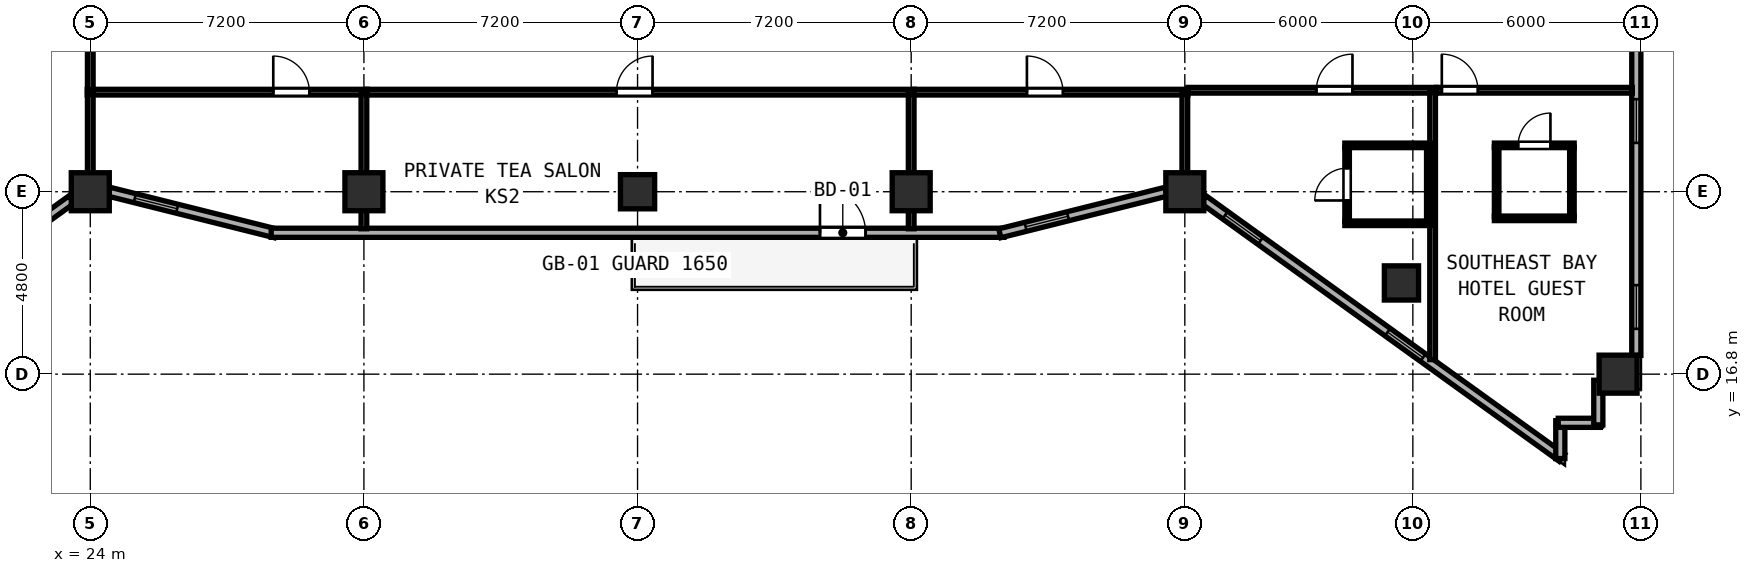
"""IFC4 building model, lengths in metres.
Left out: names, types, materials, properties, quantities, classifications, styles, units other than length and angle.
Written with IfcOpenShell. Run it as: python <this file> out.ifc"""

import sys

from ifc_helpers import new_model, si_unit, direction, frame, frame_2d, origin, origin_2d, place, context, subcontext, project, spatial, rectangle, hollow_rectangle, extrude, element, fill, save


model = new_model("IFC4")
c1 = context("Model", 3, precision=1e-05, world=origin(), true_north=direction((0.0, 1.0)))
c2 = subcontext(c1, "Body", "Model", "MODEL_VIEW")
j1 = project(units=[si_unit("LENGTHUNIT", "METRE"), si_unit("PLANEANGLEUNIT", "RADIAN")], contexts=[c1])
p1 = place(None, origin())
s1 = spatial("IfcSite", under=j1, at=p1, CompositionType="ELEMENT")
p2 = place(p1, origin())
s2 = spatial("IfcBuilding", under=s1, at=p2, CompositionType="ELEMENT")
p3 = place(p2, frame((0.0, 0.0, 106.0)))
s3 = spatial("IfcBuildingStorey", under=s2, at=p3, CompositionType="ELEMENT", Elevation=106.0)
for number, where, z_axis, x_axis in (
    (1, (24.0, 21.6, 0.0), (0.0, 0.0, 1.0), (1.0, 0.0, 0.0)),
    (2, (52.8, 21.6, 0.0), (0.0, 0.0, 1.0), (1.0, 0.0, 0.0)),
    (3, (31.2, 21.6, 0.0), (0.0, 0.0, 1.0), (1.0, 0.0, 0.0)),
    (4, (45.6, 21.6, 0.0), (0.0, 0.0, 1.0), (1.0, 0.0, 0.0)),
    (5, (64.2, 16.8, 0.0), (0.0, 0.0, 1.0), (1.0, 0.0, 0.0)),
):
    element("IfcColumn", number, at=place(p3, frame(where, z_axis=z_axis, x_axis=x_axis)), inside=s3, PredefinedType="COLUMN", context=c2, shape_type="SweptSolid", body=[
        extrude(hollow_rectangle(XDim=1.0, YDim=1.0, WallThickness=0.038, at=origin_2d()), origin(), (0.0, 0.0, 1.0), 3.8),
    ])
for number, where, z_axis, x_axis in (
    (6, (38.4, 21.6, 0.0), (0.0, 0.0, 1.0), (1.0, 0.0, 0.0)),
    (7, (58.5, 19.2, 0.0), (0.0, 0.0, 1.0), (1.0, 0.0, 0.0)),
):
    element("IfcColumn", number, at=place(p3, frame(where, z_axis=z_axis, x_axis=x_axis)), inside=s3, PredefinedType="COLUMN", context=c2, shape_type="SweptSolid", body=[
        extrude(hollow_rectangle(XDim=0.9, YDim=0.9, WallThickness=0.034, at=origin_2d()), origin(), (0.0, 0.0, 1.0), 3.8),
    ])
p4 = place(p3, frame((14.075, 14.602, 0.0), z_axis=(0.0, 0.0, 1.0), x_axis=(0.811543504691, 0.584291998913, 0.0)))
e8 = element("IfcWall", 8, at=p4, inside=s3, PredefinedType="SOLIDWALL", context=c2, shape_type="SweptSolid", body=[
    extrude(rectangle(XDim=11.623, YDim=0.24, at=frame_2d((5.812, 0.0))), origin(), (0.0, 0.0, 1.0), 3.145),
])
p5 = place(p4, frame((0.7, 0.0, 0.85)))
e9 = element("IfcOpeningElement", 9, at=p5, cuts=e8, PredefinedType="OPENING", context=c2, shape_type="SweptSolid", body=[
    extrude(rectangle(XDim=1.15, YDim=1.8, at=frame_2d((0.575, 0.9))), frame((0.0, 0.13, 0.0), z_axis=(0.0, -1.0, 0.0), x_axis=(1.0, 0.0, 0.0)), (0.0, 0.0, 1.0), 0.26),
])
p6 = place(p4, frame((6.1, 0.0, 0.85)))
e10 = element("IfcOpeningElement", 10, at=p6, cuts=e8, PredefinedType="OPENING", context=c2, shape_type="SweptSolid", body=[
    extrude(rectangle(XDim=1.15, YDim=1.8, at=frame_2d((0.575, 0.9))), frame((0.0, 0.13, 0.0), z_axis=(0.0, -1.0, 0.0), x_axis=(1.0, 0.0, 0.0)), (0.0, 0.0, 1.0), 0.26),
])
p7 = place(p3, frame((24.492, 21.601, 0.0), z_axis=(0.0, 0.0, 1.0), x_axis=(0.970145683738, -0.242522890311, 0.0)))
e11 = element("IfcWall", 11, at=p7, inside=s3, PredefinedType="SOLIDWALL", context=c2, shape_type="SweptSolid", body=[
    extrude(rectangle(XDim=4.511, YDim=0.24, at=frame_2d((2.255, 0.0))), origin(), (0.0, 0.0, 1.0), 3.145),
])
p8 = place(p7, frame((0.7, 0.0, 0.85)))
e12 = element("IfcOpeningElement", 12, at=p8, cuts=e11, PredefinedType="OPENING", context=c2, shape_type="SweptSolid", body=[
    extrude(rectangle(XDim=1.15, YDim=1.8, at=frame_2d((0.575, 0.9))), frame((0.0, 0.13, 0.0), z_axis=(0.0, -1.0, 0.0), x_axis=(1.0, 0.0, 0.0)), (0.0, 0.0, 1.0), 0.26),
])
p9 = place(p3, frame((28.76, 20.52, 0.0), z_axis=(0.0, 0.0, 1.0), x_axis=(1.0, 0.0, 0.0)))
e13 = element("IfcWall", 13, at=p9, inside=s3, PredefinedType="SOLIDWALL", context=c2, shape_type="SweptSolid", body=[
    extrude(rectangle(XDim=19.281, YDim=0.24, at=frame_2d((9.64, 0.0))), origin(), (0.0, 0.0, 1.0), 3.6),
])
p10 = place(p9, frame((15.64, 0.0, 0.0), z_axis=(0.0, 0.0, 1.0), x_axis=(-1.0, 0.0, 0.0)))
e14 = element("IfcOpeningElement", 14, at=p10, cuts=e13, PredefinedType="OPENING", context=c2, shape_type="SweptSolid", body=[
    extrude(rectangle(XDim=1.2, YDim=2.15, at=frame_2d((0.6, 1.075))), frame((0.0, 0.13, 0.0), z_axis=(0.0, -1.0, 0.0), x_axis=(1.0, 0.0, 0.0)), (0.0, 0.0, 1.0), 0.26),
])
p11 = place(p3, frame((47.932, 20.507, 0.0), z_axis=(0.0, 0.0, 1.0), x_axis=(0.970145683738, 0.242522890311, 0.0)))
e15 = element("IfcWall", 15, at=p11, inside=s3, PredefinedType="SOLIDWALL", context=c2, shape_type="SweptSolid", body=[
    extrude(rectangle(XDim=4.511, YDim=0.24, at=frame_2d((2.255, 0.0))), origin(), (0.0, 0.0, 1.0), 3.145),
])
p12 = place(p11, frame((0.7, 0.0, 0.85)))
e16 = element("IfcOpeningElement", 16, at=p12, cuts=e15, PredefinedType="OPENING", context=c2, shape_type="SweptSolid", body=[
    extrude(rectangle(XDim=1.15, YDim=1.8, at=frame_2d((0.575, 0.9))), frame((0.0, 0.13, 0.0), z_axis=(0.0, -1.0, 0.0), x_axis=(1.0, 0.0, 0.0)), (0.0, 0.0, 1.0), 0.26),
])
p13 = place(p3, frame((53.292, 21.394, 0.0), z_axis=(0.0, 0.0, 1.0), x_axis=(0.811543504691, -0.584291998913, 0.0)))
e17 = element("IfcWall", 17, at=p13, inside=s3, PredefinedType="SOLIDWALL", context=c2, shape_type="SweptSolid", body=[
    extrude(rectangle(XDim=11.623, YDim=0.24, at=frame_2d((5.812, 0.0))), origin(), (0.0, 0.0, 1.0), 3.145),
])
p14 = place(p13, frame((0.7, 0.0, 0.85)))
e18 = element("IfcOpeningElement", 18, at=p14, cuts=e17, PredefinedType="OPENING", context=c2, shape_type="SweptSolid", body=[
    extrude(rectangle(XDim=1.15, YDim=1.8, at=frame_2d((0.575, 0.9))), frame((0.0, 0.13, 0.0), z_axis=(0.0, -1.0, 0.0), x_axis=(1.0, 0.0, 0.0)), (0.0, 0.0, 1.0), 0.26),
])
p15 = place(p13, frame((5.967, 0.0, 0.85)))
e19 = element("IfcOpeningElement", 19, at=p15, cuts=e17, PredefinedType="OPENING", context=c2, shape_type="SweptSolid", body=[
    extrude(rectangle(XDim=1.15, YDim=1.8, at=frame_2d((0.575, 0.9))), frame((0.0, 0.13, 0.0), z_axis=(0.0, -1.0, 0.0), x_axis=(1.0, 0.0, 0.0)), (0.0, 0.0, 1.0), 0.26),
])
p16 = place(p3, frame((62.68, 14.579, 0.0), z_axis=(0.0, 0.0, 1.0), x_axis=(0.0, 1.0, 0.0)))
e20 = element("IfcWall", 20, at=p16, inside=s3, PredefinedType="SOLIDWALL", context=c2, shape_type="SweptSolid", body=[
    extrude(rectangle(XDim=0.996, YDim=0.24, at=frame_2d((0.498, 0.0))), origin(), (0.0, 0.0, 1.0), 3.6),
])
p17 = place(p3, frame((62.625, 15.52, 0.0), z_axis=(0.0, 0.0, 1.0), x_axis=(1.0, 0.0, 0.0)))
e21 = element("IfcWall", 21, at=p17, inside=s3, PredefinedType="SOLIDWALL", context=c2, shape_type="SweptSolid", body=[
    extrude(rectangle(XDim=1.11, YDim=0.24, at=frame_2d((0.555, 0.0))), origin(), (0.0, 0.0, 1.0), 3.6),
])
p18 = place(p3, frame((63.68, 15.465, 0.0), z_axis=(0.0, 0.0, 1.0), x_axis=(0.0, 1.0, 0.0)))
e22 = element("IfcWall", 22, at=p18, inside=s3, PredefinedType="SOLIDWALL", context=c2, shape_type="SweptSolid", body=[
    extrude(rectangle(XDim=1.175, YDim=0.24, at=frame_2d((0.587, 0.0))), origin(), (0.0, 0.0, 1.0), 3.6),
])
p19 = place(p3, frame((64.68, 17.292, 0.0), z_axis=(0.0, 0.0, 1.0), x_axis=(0.0, 1.0, 0.0)))
e23 = element("IfcWall", 23, at=p19, inside=s3, PredefinedType="SOLIDWALL", context=c2, shape_type="SweptSolid", body=[
    extrude(rectangle(XDim=9.816, YDim=0.24, at=frame_2d((4.908, 0.0))), origin(), (0.0, 0.0, 1.0), 3.6),
])
p20 = place(p19, frame((0.7, 0.0, 0.85)))
e24 = element("IfcOpeningElement", 24, at=p20, cuts=e23, PredefinedType="OPENING", context=c2, shape_type="SweptSolid", body=[
    extrude(rectangle(XDim=1.15, YDim=1.8, at=frame_2d((0.575, 0.9))), frame((0.0, 0.13, 0.0), z_axis=(0.0, -1.0, 0.0), x_axis=(1.0, 0.0, 0.0)), (0.0, 0.0, 1.0), 0.26),
])
p21 = place(p19, frame((5.593, 0.0, 0.85)))
e25 = element("IfcOpeningElement", 25, at=p21, cuts=e23, PredefinedType="OPENING", context=c2, shape_type="SweptSolid", body=[
    extrude(rectangle(XDim=1.15, YDim=1.8, at=frame_2d((0.575, 0.9))), frame((0.0, 0.13, 0.0), z_axis=(0.0, -1.0, 0.0), x_axis=(1.0, 0.0, 0.0)), (0.0, 0.0, 1.0), 0.26),
])
p22 = place(p3, frame((23.92, 24.22, 0.0), z_axis=(0.0, 0.0, 1.0), x_axis=(1.0, 0.0, 0.0)))
e26 = element("IfcWall", 26, at=p22, inside=s3, PredefinedType="PARTITIONING", context=c2, shape_type="SweptSolid", body=[
    extrude(rectangle(XDim=7.36, YDim=0.15, at=frame_2d((3.68, 0.0))), origin(), (0.0, 0.0, 1.0), 3.6),
])
p23 = place(p22, frame((5.845, 0.0, 0.0), z_axis=(0.0, 0.0, 1.0), x_axis=(-1.0, 0.0, 0.0)))
e27 = element("IfcOpeningElement", 27, at=p23, cuts=e26, PredefinedType="OPENING", context=c2, shape_type="SweptSolid", body=[
    extrude(rectangle(XDim=0.95, YDim=2.12, at=frame_2d((0.475, 1.06))), frame((0.0, 0.085, 0.0), z_axis=(0.0, -1.0, 0.0), x_axis=(1.0, 0.0, 0.0)), (0.0, 0.0, 1.0), 0.17),
])
p24 = place(p3, frame((24.0, 21.819, 0.0), z_axis=(0.0, 0.0, 1.0), x_axis=(0.0, 1.0, 0.0)))
e28 = element("IfcWall", 28, at=p24, inside=s3, PredefinedType="PARTITIONING", context=c2, shape_type="SweptSolid", body=[
    extrude(rectangle(XDim=2.341, YDim=0.15, at=frame_2d((1.171, 0.0))), origin(), (0.0, 0.0, 1.0), 3.145),
])
p25 = place(p3, frame((31.2, 20.625, 0.0), z_axis=(0.0, 0.0, 1.0), x_axis=(0.0, 1.0, 0.0)))
e29 = element("IfcWall", 29, at=p25, inside=s3, PredefinedType="PARTITIONING", context=c2, shape_type="SweptSolid", body=[
    extrude(rectangle(XDim=3.535, YDim=0.15, at=frame_2d((1.768, 0.0))), origin(), (0.0, 0.0, 1.0), 3.085),
])
p26 = place(p3, frame((31.282, 24.22, 0.0), z_axis=(0.0, 0.0, 1.0), x_axis=(1.0, 0.0, 0.0)))
e30 = element("IfcWall", 30, at=p26, inside=s3, PredefinedType="PARTITIONING", context=c2, shape_type="SweptSolid", body=[
    extrude(rectangle(XDim=14.398, YDim=0.15, at=frame_2d((7.199, 0.0))), origin(), (0.0, 0.0, 1.0), 3.6),
])
p27 = place(p26, frame((7.513, 0.0, 0.0), z_axis=(0.0, 0.0, 1.0), x_axis=(-1.0, 0.0, 0.0)))
e31 = element("IfcOpeningElement", 31, at=p27, cuts=e30, PredefinedType="OPENING", context=c2, shape_type="SweptSolid", body=[
    extrude(rectangle(XDim=0.95, YDim=2.12, at=frame_2d((0.475, 1.06))), frame((0.0, 0.085, 0.0), z_axis=(0.0, -1.0, 0.0), x_axis=(1.0, 0.0, 0.0)), (0.0, 0.0, 1.0), 0.17),
])
p28 = place(p3, frame((45.6, 20.625, 0.0), z_axis=(0.0, 0.0, 1.0), x_axis=(0.0, 1.0, 0.0)))
e32 = element("IfcWall", 32, at=p28, inside=s3, PredefinedType="PARTITIONING", context=c2, shape_type="SweptSolid", body=[
    extrude(rectangle(XDim=3.535, YDim=0.15, at=frame_2d((1.768, 0.0))), origin(), (0.0, 0.0, 1.0), 3.085),
])
p29 = place(p3, frame((45.682, 24.22, 0.0), z_axis=(0.0, 0.0, 1.0), x_axis=(1.0, 0.0, 0.0)))
e33 = element("IfcWall", 33, at=p29, inside=s3, PredefinedType="PARTITIONING", context=c2, shape_type="SweptSolid", body=[
    extrude(rectangle(XDim=7.198, YDim=0.15, at=frame_2d((3.599, 0.0))), origin(), (0.0, 0.0, 1.0), 3.6),
])
p30 = place(p29, frame((3.913, 0.0, 0.0), z_axis=(0.0, 0.0, 1.0), x_axis=(-1.0, 0.0, 0.0)))
e34 = element("IfcOpeningElement", 34, at=p30, cuts=e33, PredefinedType="OPENING", context=c2, shape_type="SweptSolid", body=[
    extrude(rectangle(XDim=0.95, YDim=2.12, at=frame_2d((0.475, 1.06))), frame((0.0, 0.085, 0.0), z_axis=(0.0, -1.0, 0.0), x_axis=(1.0, 0.0, 0.0)), (0.0, 0.0, 1.0), 0.17),
])
p31 = place(p3, frame((52.8, 21.819, 0.0), z_axis=(0.0, 0.0, 1.0), x_axis=(0.0, 1.0, 0.0)))
e35 = element("IfcWall", 35, at=p31, inside=s3, PredefinedType="PARTITIONING", context=c2, shape_type="SweptSolid", body=[
    extrude(rectangle(XDim=2.341, YDim=0.15, at=frame_2d((1.171, 0.0))), origin(), (0.0, 0.0, 1.0), 3.145),
])
p32 = place(p3, frame((24.0, 24.28, 0.0), z_axis=(0.0, 0.0, 1.0), x_axis=(0.0, 1.0, 0.0)))
e36 = element("IfcWall", 36, at=p32, inside=s3, PredefinedType="PARTITIONING", context=c2, shape_type="SweptSolid", body=[
    extrude(rectangle(XDim=2.01, YDim=0.15, at=frame_2d((1.005, 0.0))), origin(), (0.0, 0.0, 1.0), 3.145),
])
p33 = place(p3, frame((52.882, 24.27, 0.0), z_axis=(0.0, 0.0, 1.0), x_axis=(1.0, 0.0, 0.0)))
e37 = element("IfcWall", 37, at=p33, inside=s3, PredefinedType="PARTITIONING", context=c2, shape_type="SweptSolid", body=[
    extrude(rectangle(XDim=6.538, YDim=0.15, at=frame_2d((3.269, 0.0))), origin(), (0.0, 0.0, 1.0), 3.6),
])
p34 = place(p33, frame((4.329, 0.0, 0.0), z_axis=(0.0, 0.0, 1.0), x_axis=(-1.0, 0.0, 0.0)))
e38 = element("IfcOpeningElement", 38, at=p34, cuts=e37, PredefinedType="OPENING", context=c2, shape_type="SweptSolid", body=[
    extrude(rectangle(XDim=0.95, YDim=2.15, at=frame_2d((0.475, 1.075))), frame((0.0, 0.085, 0.0), z_axis=(0.0, -1.0, 0.0), x_axis=(1.0, 0.0, 0.0)), (0.0, 0.0, 1.0), 0.17),
])
p35 = place(p3, frame((59.32, 17.183, 0.0), z_axis=(0.0, 0.0, 1.0), x_axis=(0.0, 1.0, 0.0)))
e39 = element("IfcWall", 39, at=p35, inside=s3, PredefinedType="PARTITIONING", context=c2, shape_type="SweptSolid", body=[
    extrude(rectangle(XDim=7.027, YDim=0.15, at=frame_2d((3.514, 0.0))), origin(), (0.0, 0.0, 1.0), 3.6),
])
for number, where, z_axis, x_axis in (
    (40, (57.01, 22.82, 0.0), (0.0, 0.0, 1.0), (1.0, 0.0, 0.0)),
    (41, (57.01, 20.77, 0.0), (0.0, 0.0, 1.0), (1.0, 0.0, 0.0)),
):
    element("IfcWall", number, at=place(p3, frame(where, z_axis=z_axis, x_axis=x_axis)), inside=s3, PredefinedType="PARTITIONING", context=c2, shape_type="SweptSolid", body=[
        extrude(rectangle(XDim=2.25, YDim=0.12, at=frame_2d((1.125, 0.0))), origin(), (0.0, 0.0, 1.0), 3.6),
    ])
p36 = place(p3, frame((57.07, 20.815, 0.0), z_axis=(0.0, 0.0, 1.0), x_axis=(0.0, 1.0, 0.0)))
e42 = element("IfcWall", 42, at=p36, inside=s3, PredefinedType="PARTITIONING", context=c2, shape_type="SweptSolid", body=[
    extrude(rectangle(XDim=1.96, YDim=0.12, at=frame_2d((0.98, 0.0))), origin(), (0.0, 0.0, 1.0), 3.6),
])
p37 = place(p36, frame((1.405, 0.0, 0.0), z_axis=(0.0, 0.0, 1.0), x_axis=(-1.0, 0.0, 0.0)))
e43 = element("IfcOpeningElement", 43, at=p37, cuts=e42, PredefinedType="OPENING", context=c2, shape_type="SweptSolid", body=[
    extrude(rectangle(XDim=0.85, YDim=2.1, at=frame_2d((0.425, 1.05))), frame((0.0, 0.07, 0.0), z_axis=(0.0, -1.0, 0.0), x_axis=(1.0, 0.0, 0.0)), (0.0, 0.0, 1.0), 0.14),
])
p38 = place(p3, frame((59.22, 20.815, 0.0), z_axis=(0.0, 0.0, 1.0), x_axis=(0.0, 1.0, 0.0)))
e44 = element("IfcWall", 44, at=p38, inside=s3, PredefinedType="PARTITIONING", context=c2, shape_type="SweptSolid", body=[
    extrude(rectangle(XDim=1.96, YDim=0.12, at=frame_2d((0.98, 0.0))), origin(), (0.0, 0.0, 1.0), 3.6),
])
p39 = place(p3, frame((59.422, 24.27, 0.0), z_axis=(0.0, 0.0, 1.0), x_axis=(1.0, 0.0, 0.0)))
e45 = element("IfcWall", 45, at=p39, inside=s3, PredefinedType="PARTITIONING", context=c2, shape_type="SweptSolid", body=[
    extrude(rectangle(XDim=5.153, YDim=0.15, at=frame_2d((2.576, 0.0))), origin(), (0.0, 0.0, 1.0), 3.6),
])
p40 = place(p39, frame((1.09, 0.0, 0.0), z_axis=(0.0, 0.0, 1.0), x_axis=(-1.0, 0.0, 0.0)))
e46 = element("IfcOpeningElement", 46, at=p40, cuts=e45, PredefinedType="OPENING", context=c2, shape_type="SweptSolid", body=[
    extrude(rectangle(XDim=0.95, YDim=2.15, at=frame_2d((0.475, 1.075))), frame((0.0, 0.085, 0.0), z_axis=(0.0, -1.0, 0.0), x_axis=(1.0, 0.0, 0.0)), (0.0, 0.0, 1.0), 0.17),
])
p41 = place(p3, frame((60.945, 22.82, 0.0), z_axis=(0.0, 0.0, 1.0), x_axis=(1.0, 0.0, 0.0)))
e47 = element("IfcWall", 47, at=p41, inside=s3, PredefinedType="PARTITIONING", context=c2, shape_type="SweptSolid", body=[
    extrude(rectangle(XDim=2.1, YDim=0.12, at=frame_2d((1.05, 0.0))), origin(), (0.0, 0.0, 1.0), 3.6),
])
p42 = place(p41, frame((1.475, 0.0, 0.0), z_axis=(0.0, 0.0, 1.0), x_axis=(-1.0, 0.0, 0.0)))
e48 = element("IfcOpeningElement", 48, at=p42, cuts=e47, PredefinedType="OPENING", context=c2, shape_type="SweptSolid", body=[
    extrude(rectangle(XDim=0.85, YDim=2.1, at=frame_2d((0.425, 1.05))), frame((0.0, 0.07, 0.0), z_axis=(0.0, -1.0, 0.0), x_axis=(1.0, 0.0, 0.0)), (0.0, 0.0, 1.0), 0.14),
])
p43 = place(p3, frame((60.945, 20.9, 0.0), z_axis=(0.0, 0.0, 1.0), x_axis=(1.0, 0.0, 0.0)))
e49 = element("IfcWall", 49, at=p43, inside=s3, PredefinedType="PARTITIONING", context=c2, shape_type="SweptSolid", body=[
    extrude(rectangle(XDim=2.1, YDim=0.12, at=frame_2d((1.05, 0.0))), origin(), (0.0, 0.0, 1.0), 3.6),
])
for number, where, z_axis, x_axis in (
    (50, (61.005, 20.945, 0.0), (0.0, 0.0, 1.0), (0.0, 1.0, 0.0)),
    (51, (62.985, 20.945, 0.0), (0.0, 0.0, 1.0), (0.0, 1.0, 0.0)),
):
    element("IfcWall", number, at=place(p3, frame(where, z_axis=z_axis, x_axis=x_axis)), inside=s3, PredefinedType="PARTITIONING", context=c2, shape_type="SweptSolid", body=[
        extrude(rectangle(XDim=1.83, YDim=0.12, at=frame_2d((0.915, 0.0))), origin(), (0.0, 0.0, 1.0), 3.6),
    ])
p44 = place(p8, origin())
e52 = element("IfcWindow", 52, at=p44, inside=s3, PartitioningType="SINGLE_PANEL", PredefinedType="WINDOW", context=c2, shape_type="SweptSolid", body=[
    extrude(rectangle(XDim=1.15, YDim=1.8, at=frame_2d((0.575, 0.9))), frame((0.0, 0.03, 0.0), z_axis=(0.0, -1.0, 0.0), x_axis=(1.0, 0.0, 0.0)), (0.0, 0.0, 1.0), 0.06),
])
fill(e12, e52)
p45 = place(p12, origin())
e53 = element("IfcWindow", 53, at=p45, inside=s3, PartitioningType="SINGLE_PANEL", PredefinedType="WINDOW", context=c2, shape_type="SweptSolid", body=[
    extrude(rectangle(XDim=1.15, YDim=1.8, at=frame_2d((0.575, 0.9))), frame((0.0, 0.03, 0.0), z_axis=(0.0, -1.0, 0.0), x_axis=(1.0, 0.0, 0.0)), (0.0, 0.0, 1.0), 0.06),
])
fill(e16, e53)
p46 = place(p14, origin())
e54 = element("IfcWindow", 54, at=p46, inside=s3, PartitioningType="SINGLE_PANEL", PredefinedType="WINDOW", context=c2, shape_type="SweptSolid", body=[
    extrude(rectangle(XDim=1.15, YDim=1.8, at=frame_2d((0.575, 0.9))), frame((0.0, 0.03, 0.0), z_axis=(0.0, -1.0, 0.0), x_axis=(1.0, 0.0, 0.0)), (0.0, 0.0, 1.0), 0.06),
])
fill(e18, e54)
p47 = place(p15, origin())
e55 = element("IfcWindow", 55, at=p47, inside=s3, PartitioningType="SINGLE_PANEL", PredefinedType="WINDOW", context=c2, shape_type="SweptSolid", body=[
    extrude(rectangle(XDim=1.15, YDim=1.8, at=frame_2d((0.575, 0.9))), frame((0.0, 0.03, 0.0), z_axis=(0.0, -1.0, 0.0), x_axis=(1.0, 0.0, 0.0)), (0.0, 0.0, 1.0), 0.06),
])
fill(e19, e55)
p48 = place(p20, origin())
e56 = element("IfcWindow", 56, at=p48, inside=s3, PartitioningType="SINGLE_PANEL", PredefinedType="WINDOW", context=c2, shape_type="SweptSolid", body=[
    extrude(rectangle(XDim=1.15, YDim=1.8, at=frame_2d((0.575, 0.9))), frame((0.0, 0.03, 0.0), z_axis=(0.0, -1.0, 0.0), x_axis=(1.0, 0.0, 0.0)), (0.0, 0.0, 1.0), 0.06),
])
fill(e24, e56)
p49 = place(p21, origin())
e57 = element("IfcWindow", 57, at=p49, inside=s3, PartitioningType="SINGLE_PANEL", PredefinedType="WINDOW", context=c2, shape_type="SweptSolid", body=[
    extrude(rectangle(XDim=1.15, YDim=1.8, at=frame_2d((0.575, 0.9))), frame((0.0, 0.03, 0.0), z_axis=(0.0, -1.0, 0.0), x_axis=(1.0, 0.0, 0.0)), (0.0, 0.0, 1.0), 0.06),
])
fill(e25, e57)
p50 = place(p10, origin())
e58 = element("IfcDoor", 58, at=p50, inside=s3, OperationType="SINGLE_SWING_RIGHT", PredefinedType="DOOR", context=c2, shape_type="SweptSolid", body=[
    extrude(rectangle(XDim=1.2, YDim=2.15, at=frame_2d((0.6, 1.075))), frame((0.0, 0.025, 0.0), z_axis=(0.0, -1.0, 0.0), x_axis=(1.0, 0.0, 0.0)), (0.0, 0.0, 1.0), 0.05),
])
fill(e14, e58)
p51 = place(p23, origin())
e59 = element("IfcDoor", 59, at=p51, inside=s3, OperationType="SINGLE_SWING_RIGHT", PredefinedType="DOOR", context=c2, shape_type="SweptSolid", body=[
    extrude(rectangle(XDim=0.95, YDim=2.12, at=frame_2d((0.475, 1.06))), frame((0.0, 0.025, 0.0), z_axis=(0.0, -1.0, 0.0), x_axis=(1.0, 0.0, 0.0)), (0.0, 0.0, 1.0), 0.05),
])
fill(e27, e59)
p52 = place(p27, origin())
e60 = element("IfcDoor", 60, at=p52, inside=s3, OperationType="SINGLE_SWING_LEFT", PredefinedType="DOOR", context=c2, shape_type="SweptSolid", body=[
    extrude(rectangle(XDim=0.95, YDim=2.12, at=frame_2d((0.475, 1.06))), frame((0.0, 0.025, 0.0), z_axis=(0.0, -1.0, 0.0), x_axis=(1.0, 0.0, 0.0)), (0.0, 0.0, 1.0), 0.05),
])
fill(e31, e60)
p53 = place(p30, origin())
e61 = element("IfcDoor", 61, at=p53, inside=s3, OperationType="SINGLE_SWING_RIGHT", PredefinedType="DOOR", context=c2, shape_type="SweptSolid", body=[
    extrude(rectangle(XDim=0.95, YDim=2.12, at=frame_2d((0.475, 1.06))), frame((0.0, 0.025, 0.0), z_axis=(0.0, -1.0, 0.0), x_axis=(1.0, 0.0, 0.0)), (0.0, 0.0, 1.0), 0.05),
])
fill(e34, e61)
p54 = place(p34, origin())
e62 = element("IfcDoor", 62, at=p54, inside=s3, OperationType="SINGLE_SWING_LEFT", PredefinedType="DOOR", context=c2, shape_type="SweptSolid", body=[
    extrude(rectangle(XDim=0.95, YDim=2.15, at=frame_2d((0.475, 1.075))), frame((0.0, 0.025, 0.0), z_axis=(0.0, -1.0, 0.0), x_axis=(1.0, 0.0, 0.0)), (0.0, 0.0, 1.0), 0.05),
])
fill(e38, e62)
p55 = place(p37, origin())
e63 = element("IfcDoor", 63, at=p55, inside=s3, OperationType="SINGLE_SWING_RIGHT", PredefinedType="DOOR", context=c2, shape_type="SweptSolid", body=[
    extrude(rectangle(XDim=0.85, YDim=2.1, at=frame_2d((0.425, 1.05))), frame((0.0, 0.025, 0.0), z_axis=(0.0, -1.0, 0.0), x_axis=(1.0, 0.0, 0.0)), (0.0, 0.0, 1.0), 0.05),
])
fill(e43, e63)
p56 = place(p40, origin())
e64 = element("IfcDoor", 64, at=p56, inside=s3, OperationType="SINGLE_SWING_RIGHT", PredefinedType="DOOR", context=c2, shape_type="SweptSolid", body=[
    extrude(rectangle(XDim=0.95, YDim=2.15, at=frame_2d((0.475, 1.075))), frame((0.0, 0.025, 0.0), z_axis=(0.0, -1.0, 0.0), x_axis=(1.0, 0.0, 0.0)), (0.0, 0.0, 1.0), 0.05),
])
fill(e46, e64)
p57 = place(p42, origin())
e65 = element("IfcDoor", 65, at=p57, inside=s3, OperationType="SINGLE_SWING_LEFT", PredefinedType="DOOR", context=c2, shape_type="SweptSolid", body=[
    extrude(rectangle(XDim=0.85, YDim=2.1, at=frame_2d((0.425, 1.05))), frame((0.0, 0.025, 0.0), z_axis=(0.0, -1.0, 0.0), x_axis=(1.0, 0.0, 0.0)), (0.0, 0.0, 1.0), 0.05),
])
fill(e48, e65)
save(model, sys.argv[1])
